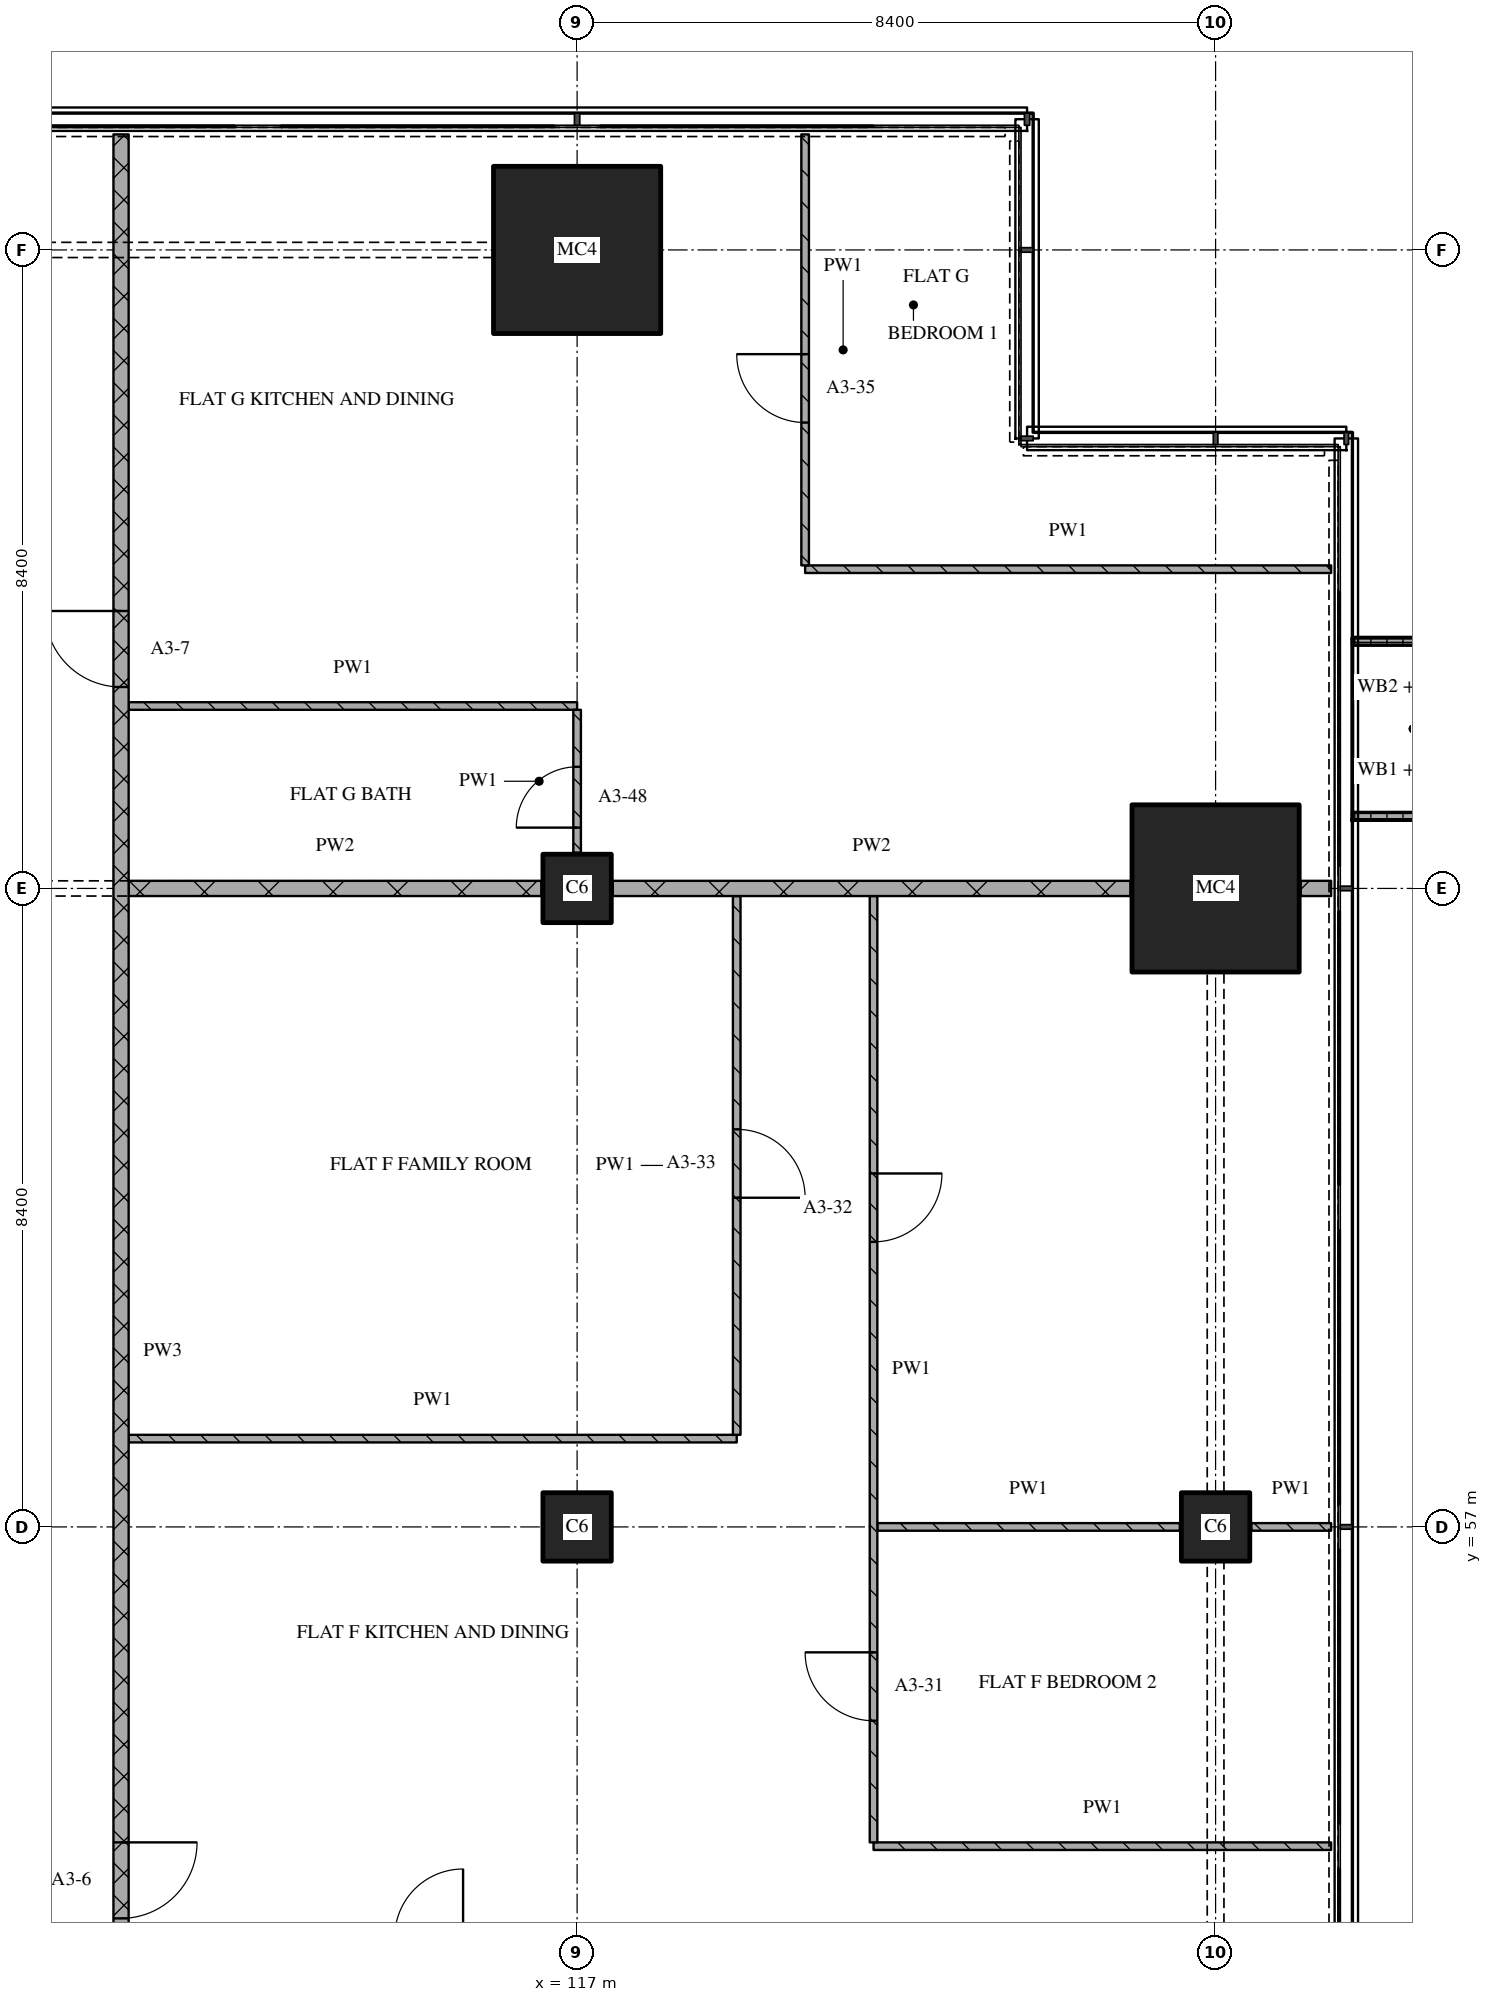
"""IFC4 building model, lengths in metres.
Left out: names, types, materials, properties, quantities, classifications, styles, units other than length and angle.
Written with IfcOpenShell. Run it as: python <this file> out.ifc"""

import sys

from ifc_helpers import new_model, si_unit, direction, frame, frame_2d, origin, origin_2d, place, context, subcontext, project, spatial, polyline, rectangle, outline, extrude, element, fill, save


model = new_model("IFC4")
c1 = context("Model", 3, precision=1e-05, world=origin(), true_north=direction((0.0, 1.0)))
c2 = subcontext(c1, "Body", "Model", "MODEL_VIEW")
j1 = project(units=[si_unit("LENGTHUNIT", "METRE"), si_unit("PLANEANGLEUNIT", "RADIAN")], contexts=[c1])
p1 = place(None, origin())
s1 = spatial("IfcSite", under=j1, at=p1, CompositionType="ELEMENT")
p2 = place(p1, origin())
s2 = spatial("IfcBuilding", under=s1, at=p2, CompositionType="ELEMENT")
p3 = place(p2, frame((0.0, 0.0, 66.0)))
s3 = spatial("IfcBuildingStorey", under=s2, at=p3, CompositionType="ELEMENT", Elevation=66.0)
for number, where, z_axis, x_axis in (
    (1, (117.0, 57.0, 0.0), (0.0, 0.0, 1.0), (1.0, 0.0, 0.0)),
    (2, (117.0, 65.4, 0.0), (0.0, 0.0, 1.0), (1.0, 0.0, 0.0)),
):
    element("IfcColumn", number, at=place(p3, frame(where, z_axis=z_axis, x_axis=x_axis)), inside=s3, PredefinedType="COLUMN", context=c2, shape_type="SweptSolid", body=[
        extrude(rectangle(XDim=0.9, YDim=0.9, at=origin_2d()), origin(), (0.0, 0.0, 1.0), 3.6),
    ])
p4 = place(p3, frame((117.0, 73.8, 0.0), z_axis=(0.0, 0.0, 1.0), x_axis=(1.0, 0.0, 0.0)))
e3 = element("IfcColumn", 3, at=p4, inside=s3, PredefinedType="COLUMN", context=c2, shape_type="SweptSolid", body=[
    extrude(rectangle(XDim=2.2, YDim=2.2, at=origin_2d()), origin(), (0.0, 0.0, 1.0), 3.6),
])
p5 = place(p3, frame((125.4, 57.0, 0.0), z_axis=(0.0, 0.0, 1.0), x_axis=(1.0, 0.0, 0.0)))
e4 = element("IfcColumn", 4, at=p5, inside=s3, PredefinedType="COLUMN", context=c2, shape_type="SweptSolid", body=[
    extrude(rectangle(XDim=0.9, YDim=0.9, at=origin_2d()), origin(), (0.0, 0.0, 1.0), 3.6),
])
p6 = place(p3, frame((125.4, 65.4, 0.0), z_axis=(0.0, 0.0, 1.0), x_axis=(1.0, 0.0, 0.0)))
e5 = element("IfcColumn", 5, at=p6, inside=s3, PredefinedType="COLUMN", context=c2, shape_type="SweptSolid", body=[
    extrude(rectangle(XDim=2.2, YDim=2.2, at=origin_2d()), origin(), (0.0, 0.0, 1.0), 3.6),
])
p7 = place(p3, origin())
e6 = element("IfcWall", 6, at=p7, inside=s3, PredefinedType="SOLIDWALL", context=c2, shape_type="SweptSolid", body=[
    extrude(outline(polyline([(127.2, 66.3), (127.2, 66.4), (128.7, 66.4), (128.7, 68.6), (127.2, 68.6), (127.2, 68.7), (128.8, 68.7), (128.8, 66.3), (127.2, 66.3)])), origin(), (0.0, 0.0, 1.0), 1.0),
])
p8 = place(p3, frame((120.9, 52.8, 0.0), z_axis=(0.0, 0.0, 1.0), x_axis=(1.0, 0.0, 0.0)))
e7 = element("IfcWall", 7, at=p8, inside=s3, PredefinedType="PARTITIONING", context=c2, shape_type="SweptSolid", body=[
    extrude(rectangle(XDim=6.02, YDim=0.1, at=frame_2d((3.01, 0.0))), origin(), (0.0, 0.0, 1.0), 3.32),
])
p9 = place(p3, frame((120.95, 57.0, 0.0), z_axis=(0.0, 0.0, 1.0), x_axis=(1.0, 0.0, 0.0)))
e8 = element("IfcWall", 8, at=p9, inside=s3, PredefinedType="PARTITIONING", context=c2, shape_type="SweptSolid", body=[
    extrude(rectangle(XDim=3.98, YDim=0.1, at=frame_2d((1.99, 0.0))), origin(), (0.0, 0.0, 1.0), 3.32),
])
p10 = place(p3, frame((125.87, 57.0, 0.0), z_axis=(0.0, 0.0, 1.0), x_axis=(1.0, 0.0, 0.0)))
e9 = element("IfcWall", 9, at=p10, inside=s3, PredefinedType="PARTITIONING", context=c2, shape_type="SweptSolid", body=[
    extrude(rectangle(XDim=1.05, YDim=0.1, at=frame_2d((0.525, 0.0))), origin(), (0.0, 0.0, 1.0), 3.32),
])
p11 = place(p3, frame((111.1, 58.162, 0.0), z_axis=(0.0, 0.0, 1.0), x_axis=(1.0, 0.0, 0.0)))
e10 = element("IfcWall", 10, at=p11, inside=s3, PredefinedType="PARTITIONING", context=c2, shape_type="SweptSolid", body=[
    extrude(rectangle(XDim=8.0, YDim=0.1, at=frame_2d((4.0, 0.0))), origin(), (0.0, 0.0, 1.0), 3.32),
])
p12 = place(p3, frame((111.1, 65.4, 0.0), z_axis=(0.0, 0.0, 1.0), x_axis=(1.0, 0.0, 0.0)))
e11 = element("IfcWall", 11, at=p12, inside=s3, PredefinedType="PARTITIONING", context=c2, shape_type="SweptSolid", body=[
    extrude(rectangle(XDim=5.43, YDim=0.2, at=frame_2d((2.715, 0.0))), origin(), (0.0, 0.0, 1.0), 2.82),
])
p13 = place(p3, frame((117.47, 65.4, 0.0), z_axis=(0.0, 0.0, 1.0), x_axis=(1.0, 0.0, 0.0)))
e12 = element("IfcWall", 12, at=p13, inside=s3, PredefinedType="PARTITIONING", context=c2, shape_type="SweptSolid", body=[
    extrude(rectangle(XDim=6.81, YDim=0.2, at=frame_2d((3.405, 0.0))), origin(), (0.0, 0.0, 1.0), 3.32),
])
p14 = place(p3, frame((126.52, 65.4, 0.0), z_axis=(0.0, 0.0, 1.0), x_axis=(1.0, 0.0, 0.0)))
e13 = element("IfcWall", 13, at=p14, inside=s3, PredefinedType="PARTITIONING", context=c2, shape_type="SweptSolid", body=[
    extrude(rectangle(XDim=0.4, YDim=0.2, at=frame_2d((0.2, 0.0))), origin(), (0.0, 0.0, 1.0), 3.32),
])
p15 = place(p3, frame((111.1, 67.8, 0.0), z_axis=(0.0, 0.0, 1.0), x_axis=(1.0, 0.0, 0.0)))
e14 = element("IfcWall", 14, at=p15, inside=s3, PredefinedType="PARTITIONING", context=c2, shape_type="SweptSolid", body=[
    extrude(rectangle(XDim=5.9, YDim=0.1, at=frame_2d((2.95, 0.0))), origin(), (0.0, 0.0, 1.0), 3.32),
])
p16 = place(p3, frame((120.0, 69.6, 0.0), z_axis=(0.0, 0.0, 1.0), x_axis=(1.0, 0.0, 0.0)))
e15 = element("IfcWall", 15, at=p16, inside=s3, PredefinedType="PARTITIONING", context=c2, shape_type="SweptSolid", body=[
    extrude(rectangle(XDim=6.92, YDim=0.1, at=frame_2d((3.46, 0.0))), origin(), (0.0, 0.0, 1.0), 3.32),
])
p17 = place(p3, frame((111.0, 75.32, 0.0), z_axis=(0.0, 0.0, 1.0), x_axis=(0.0, -1.0, 0.0)))
e16 = element("IfcWall", 16, at=p17, inside=s3, PredefinedType="PARTITIONING", context=c2, shape_type="SweptSolid", body=[
    extrude(rectangle(XDim=32.02, YDim=0.2, at=frame_2d((16.01, 0.0))), origin(), (0.0, 0.0, 1.0), 3.32),
])
p18 = place(p17, frame((6.27, 0.0, 0.0)))
e17 = element("IfcOpeningElement", 17, at=p18, cuts=e16, PredefinedType="OPENING", context=c2, shape_type="SweptSolid", body=[
    extrude(rectangle(XDim=1.0, YDim=2.1, at=frame_2d((0.5, 1.05))), frame((0.0, 0.11, 0.0), z_axis=(0.0, -1.0, 0.0), x_axis=(1.0, 0.0, 0.0)), (0.0, 0.0, 1.0), 0.22),
])
p19 = place(p17, frame((22.47, 0.0, 0.0)))
e18 = element("IfcOpeningElement", 18, at=p19, cuts=e16, PredefinedType="OPENING", context=c2, shape_type="SweptSolid", body=[
    extrude(rectangle(XDim=1.0, YDim=2.1, at=frame_2d((0.5, 1.05))), frame((0.0, 0.11, 0.0), z_axis=(0.0, -1.0, 0.0), x_axis=(1.0, 0.0, 0.0)), (0.0, 0.0, 1.0), 0.22),
])
p20 = place(p3, frame((117.0, 65.87, 0.0), z_axis=(0.0, 0.0, 1.0), x_axis=(0.0, 1.0, 0.0)))
e19 = element("IfcWall", 19, at=p20, inside=s3, PredefinedType="PARTITIONING", context=c2, shape_type="SweptSolid", body=[
    extrude(rectangle(XDim=1.88, YDim=0.1, at=frame_2d((0.94, 0.0))), origin(), (0.0, 0.0, 1.0), 3.32),
])
p21 = place(p20, frame((0.33, 0.0, 0.0)))
e20 = element("IfcOpeningElement", 20, at=p21, cuts=e19, PredefinedType="OPENING", context=c2, shape_type="SweptSolid", body=[
    extrude(rectangle(XDim=0.8, YDim=2.1, at=frame_2d((0.4, 1.05))), frame((0.0, 0.06, 0.0), z_axis=(0.0, -1.0, 0.0), x_axis=(1.0, 0.0, 0.0)), (0.0, 0.0, 1.0), 0.12),
])
p22 = place(p3, frame((119.1, 58.212, 0.0), z_axis=(0.0, 0.0, 1.0), x_axis=(0.0, 1.0, 0.0)))
e21 = element("IfcWall", 21, at=p22, inside=s3, PredefinedType="PARTITIONING", context=c2, shape_type="SweptSolid", body=[
    extrude(rectangle(XDim=7.088, YDim=0.1, at=frame_2d((3.544, 0.0))), origin(), (0.0, 0.0, 1.0), 3.32),
])
p23 = place(p22, frame((3.119, 0.0, 0.0)))
e22 = element("IfcOpeningElement", 22, at=p23, cuts=e21, PredefinedType="OPENING", context=c2, shape_type="SweptSolid", body=[
    extrude(rectangle(XDim=0.9, YDim=2.1, at=frame_2d((0.45, 1.05))), frame((0.0, 0.06, 0.0), z_axis=(0.0, -1.0, 0.0), x_axis=(1.0, 0.0, 0.0)), (0.0, 0.0, 1.0), 0.12),
])
p24 = place(p3, frame((120.0, 75.32, 0.0), z_axis=(0.0, 0.0, 1.0), x_axis=(0.0, -1.0, 0.0)))
e23 = element("IfcWall", 23, at=p24, inside=s3, PredefinedType="PARTITIONING", context=c2, shape_type="SweptSolid", body=[
    extrude(rectangle(XDim=5.67, YDim=0.1, at=frame_2d((2.835, 0.0))), origin(), (0.0, 0.0, 1.0), 3.32),
])
p25 = place(p24, frame((2.891, 0.0, 0.0)))
e24 = element("IfcOpeningElement", 24, at=p25, cuts=e23, PredefinedType="OPENING", context=c2, shape_type="SweptSolid", body=[
    extrude(rectangle(XDim=0.9, YDim=2.1, at=frame_2d((0.45, 1.05))), frame((0.0, 0.06, 0.0), z_axis=(0.0, -1.0, 0.0), x_axis=(1.0, 0.0, 0.0)), (0.0, 0.0, 1.0), 0.12),
])
p26 = place(p3, frame((120.9, 65.3, 0.0), z_axis=(0.0, 0.0, 1.0), x_axis=(0.0, -1.0, 0.0)))
e25 = element("IfcWall", 25, at=p26, inside=s3, PredefinedType="PARTITIONING", context=c2, shape_type="SweptSolid", body=[
    extrude(rectangle(XDim=12.45, YDim=0.1, at=frame_2d((6.225, 0.0))), origin(), (0.0, 0.0, 1.0), 3.32),
])
p27 = place(p26, frame((3.65, 0.0, 0.0)))
e26 = element("IfcOpeningElement", 26, at=p27, cuts=e25, PredefinedType="OPENING", context=c2, shape_type="SweptSolid", body=[
    extrude(rectangle(XDim=0.9, YDim=2.1, at=frame_2d((0.45, 1.05))), frame((0.0, 0.06, 0.0), z_axis=(0.0, -1.0, 0.0), x_axis=(1.0, 0.0, 0.0)), (0.0, 0.0, 1.0), 0.12),
])
p28 = place(p26, frame((9.95, 0.0, 0.0)))
e27 = element("IfcOpeningElement", 27, at=p28, cuts=e25, PredefinedType="OPENING", context=c2, shape_type="SweptSolid", body=[
    extrude(rectangle(XDim=0.9, YDim=2.1, at=frame_2d((0.45, 1.05))), frame((0.0, 0.06, 0.0), z_axis=(0.0, -1.0, 0.0), x_axis=(1.0, 0.0, 0.0)), (0.0, 0.0, 1.0), 0.12),
])
p29 = place(p18, origin())
e28 = element("IfcDoor", 28, at=p29, inside=s3, OperationType="SINGLE_SWING_RIGHT", PredefinedType="DOOR", context=c2, shape_type="SweptSolid", body=[
    extrude(rectangle(XDim=1.0, YDim=2.1, at=frame_2d((0.5, 1.05))), frame((0.0, 0.025, 0.0), z_axis=(0.0, -1.0, 0.0), x_axis=(1.0, 0.0, 0.0)), (0.0, 0.0, 1.0), 0.05),
])
fill(e17, e28)
p30 = place(p19, origin())
e29 = element("IfcDoor", 29, at=p30, inside=s3, OperationType="SINGLE_SWING_LEFT", PredefinedType="DOOR", context=c2, shape_type="SweptSolid", body=[
    extrude(rectangle(XDim=1.0, YDim=2.1, at=frame_2d((0.5, 1.05))), frame((0.0, 0.025, 0.0), z_axis=(0.0, -1.0, 0.0), x_axis=(1.0, 0.0, 0.0)), (0.0, 0.0, 1.0), 0.05),
])
fill(e18, e29)
p31 = place(p21, origin())
e30 = element("IfcDoor", 30, at=p31, inside=s3, OperationType="SINGLE_SWING_LEFT", PredefinedType="DOOR", context=c2, shape_type="SweptSolid", body=[
    extrude(rectangle(XDim=0.8, YDim=2.1, at=frame_2d((0.4, 1.05))), frame((0.0, 0.025, 0.0), z_axis=(0.0, -1.0, 0.0), x_axis=(1.0, 0.0, 0.0)), (0.0, 0.0, 1.0), 0.05),
])
fill(e20, e30)
p32 = place(p23, origin())
e31 = element("IfcDoor", 31, at=p32, inside=s3, OperationType="SINGLE_SWING_RIGHT", PredefinedType="DOOR", context=c2, shape_type="SweptSolid", body=[
    extrude(rectangle(XDim=0.9, YDim=2.1, at=frame_2d((0.45, 1.05))), frame((0.0, 0.025, 0.0), z_axis=(0.0, -1.0, 0.0), x_axis=(1.0, 0.0, 0.0)), (0.0, 0.0, 1.0), 0.05),
])
fill(e22, e31)
p33 = place(p25, origin())
e32 = element("IfcDoor", 32, at=p33, inside=s3, OperationType="SINGLE_SWING_RIGHT", PredefinedType="DOOR", context=c2, shape_type="SweptSolid", body=[
    extrude(rectangle(XDim=0.9, YDim=2.1, at=frame_2d((0.45, 1.05))), frame((0.0, 0.025, 0.0), z_axis=(0.0, -1.0, 0.0), x_axis=(1.0, 0.0, 0.0)), (0.0, 0.0, 1.0), 0.05),
])
fill(e24, e32)
p34 = place(p27, origin())
e33 = element("IfcDoor", 33, at=p34, inside=s3, OperationType="SINGLE_SWING_LEFT", PredefinedType="DOOR", context=c2, shape_type="SweptSolid", body=[
    extrude(rectangle(XDim=0.9, YDim=2.1, at=frame_2d((0.45, 1.05))), frame((0.0, 0.025, 0.0), z_axis=(0.0, -1.0, 0.0), x_axis=(1.0, 0.0, 0.0)), (0.0, 0.0, 1.0), 0.05),
])
fill(e26, e33)
p35 = place(p28, origin())
e34 = element("IfcDoor", 34, at=p35, inside=s3, OperationType="SINGLE_SWING_RIGHT", PredefinedType="DOOR", context=c2, shape_type="SweptSolid", body=[
    extrude(rectangle(XDim=0.9, YDim=2.1, at=frame_2d((0.45, 1.05))), frame((0.0, 0.025, 0.0), z_axis=(0.0, -1.0, 0.0), x_axis=(1.0, 0.0, 0.0)), (0.0, 0.0, 1.0), 0.05),
])
fill(e27, e34)
save(model, sys.argv[1])
